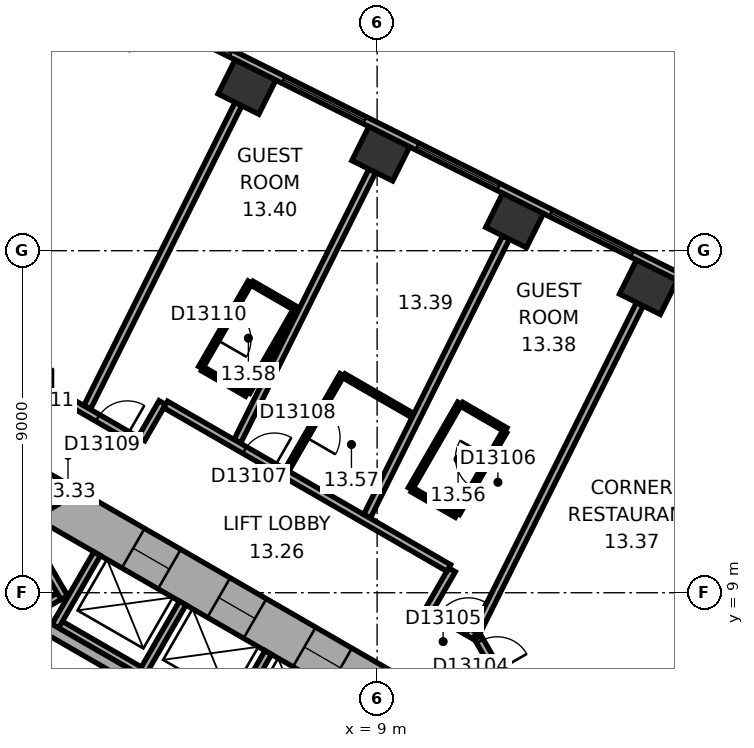
"""IFC4 building model, lengths in metres.
Left out: names, types, materials, properties, quantities, classifications, styles, units other than length and angle.
Written with IfcOpenShell. Run it as: python <this file> out.ifc"""

import sys

from ifc_helpers import new_model, si_unit, direction, frame, frame_2d, origin, origin_2d, place, context, subcontext, project, spatial, rectangle, extrude, element, fill, save


model = new_model("IFC4")
c1 = context("Model", 3, precision=1e-05, world=origin(), true_north=direction((0.0, 1.0)))
c2 = subcontext(c1, "Body", "Model", "MODEL_VIEW")
j1 = project(units=[si_unit("LENGTHUNIT", "METRE"), si_unit("PLANEANGLEUNIT", "RADIAN")], contexts=[c1])
p1 = place(None, origin())
s1 = spatial("IfcSite", under=j1, at=p1, CompositionType="ELEMENT")
p2 = place(p1, origin())
s2 = spatial("IfcBuilding", under=s1, at=p2, CompositionType="ELEMENT")
p3 = place(p2, frame((0.0, 0.0, 63.8)))
s3 = spatial("IfcBuildingStorey", under=s2, at=p3, CompositionType="ELEMENT", Elevation=63.8)
for number, where, z_axis, x_axis in (
    (1, (16.138, 17.04, 0.0), (0.0, 0.0, 1.0), (-0.895, 0.446, 0.0)),
    (2, (12.616, 18.795, 0.0), (0.0, 0.0, 1.0), (-0.895, 0.446, 0.0)),
    (3, (9.095, 20.551, 0.0), (0.0, 0.0, 1.0), (-0.895, 0.446, 0.0)),
    (4, (5.574, 22.306, 0.0), (0.0, 0.0, 1.0), (-0.895, 0.446, 0.0)),
):
    element("IfcColumn", number, at=place(p3, frame(where, z_axis=z_axis, x_axis=x_axis)), inside=s3, PredefinedType="COLUMN", context=c2, shape_type="SweptSolid", body=[
        extrude(rectangle(XDim=1.2, YDim=1.0, at=origin_2d()), origin(), (0.0, 0.0, 1.0), 3.3),
    ])
p4 = place(p3, frame((10.4, 5.658, 0.0), z_axis=(0.0, 0.0, 1.0), x_axis=(-0.866021384402, 0.500006961711, 0.0)))
e5 = element("IfcWall", 5, at=p4, inside=s3, PredefinedType="SHEAR", context=c2, shape_type="SweptSolid", body=[
    extrude(rectangle(XDim=12.355, YDim=1.2, at=frame_2d((6.178, 0.0))), origin(), (0.0, 0.0, 1.0), 3.3),
])
p5 = place(p4, frame((2.728, 0.0, 0.0)))
e6 = element("IfcOpeningElement", 6, at=p5, cuts=e5, PredefinedType="OPENING", context=c2, shape_type="SweptSolid", body=[
    extrude(rectangle(XDim=1.1, YDim=2.1, at=frame_2d((0.55, 1.05))), frame((0.0, 0.61, 0.0), z_axis=(0.0, -1.0, 0.0), x_axis=(1.0, 0.0, 0.0)), (0.0, 0.0, 1.0), 1.22),
])
p6 = place(p4, frame((5.328, 0.0, 0.0)))
e7 = element("IfcOpeningElement", 7, at=p6, cuts=e5, PredefinedType="OPENING", context=c2, shape_type="SweptSolid", body=[
    extrude(rectangle(XDim=1.1, YDim=2.1, at=frame_2d((0.55, 1.05))), frame((0.0, 0.61, 0.0), z_axis=(0.0, -1.0, 0.0), x_axis=(1.0, 0.0, 0.0)), (0.0, 0.0, 1.0), 1.22),
])
p7 = place(p4, frame((7.928, 0.0, 0.0)))
e8 = element("IfcOpeningElement", 8, at=p7, cuts=e5, PredefinedType="OPENING", context=c2, shape_type="SweptSolid", body=[
    extrude(rectangle(XDim=1.1, YDim=2.1, at=frame_2d((0.55, 1.05))), frame((0.0, 0.61, 0.0), z_axis=(0.0, -1.0, 0.0), x_axis=(1.0, 0.0, 0.0)), (0.0, 0.0, 1.0), 1.22),
])
p8 = place(p3, frame((0.3, 11.836, 0.0), z_axis=(0.0, 0.0, 1.0), x_axis=(-0.866021384402, -0.500006961711, 0.0)))
e9 = element("IfcWall", 9, at=p8, inside=s3, PredefinedType="SHEAR", context=c2, shape_type="SweptSolid", body=[
    extrude(rectangle(XDim=12.355, YDim=1.2, at=frame_2d((6.178, 0.0))), origin(), (0.0, 0.0, 1.0), 3.3),
])
p9 = place(p8, frame((6.378, 0.0, 0.0)))
e10 = element("IfcOpeningElement", 10, at=p9, cuts=e9, PredefinedType="OPENING", context=c2, shape_type="SweptSolid", body=[
    extrude(rectangle(XDim=1.5, YDim=2.1, at=frame_2d((0.75, 1.05))), frame((0.0, 0.61, 0.0), z_axis=(0.0, -1.0, 0.0), x_axis=(1.0, 0.0, 0.0)), (0.0, 0.0, 1.0), 1.22),
])
p10 = place(p8, frame((1.828, 0.0, 0.0)))
e11 = element("IfcOpeningElement", 11, at=p10, cuts=e9, PredefinedType="OPENING", context=c2, shape_type="SweptSolid", body=[
    extrude(rectangle(XDim=1.1, YDim=2.1, at=frame_2d((0.55, 1.05))), frame((0.0, 0.61, 0.0), z_axis=(0.0, -1.0, 0.0), x_axis=(1.0, 0.0, 0.0)), (0.0, 0.0, 1.0), 1.22),
])
p11 = place(p3, frame((20.63, 15.47, 0.0), z_axis=(0.0, 0.0, 1.0), x_axis=(-0.894934518609, 0.446197498203, 0.0)))
e12 = element("IfcWall", 12, at=p11, inside=s3, PredefinedType="STANDARD", context=c2, shape_type="SweptSolid", body=[
    extrude(rectangle(XDim=21.246, YDim=0.2, at=frame_2d((10.623, 0.0))), origin(), (0.0, 0.0, 1.0), 3.3),
])
p12 = place(p11, frame((1.553, 0.0, 0.8)))
e13 = element("IfcOpeningElement", 13, at=p12, cuts=e12, PredefinedType="OPENING", context=c2, shape_type="SweptSolid", body=[
    extrude(rectangle(XDim=2.4, YDim=1.7, at=frame_2d((1.2, 0.85))), frame((0.0, 0.11, 0.0), z_axis=(0.0, -1.0, 0.0), x_axis=(1.0, 0.0, 0.0)), (0.0, 0.0, 1.0), 0.22),
])
p13 = place(p11, frame((5.488, 0.0, 0.8)))
e14 = element("IfcOpeningElement", 14, at=p13, cuts=e12, PredefinedType="OPENING", context=c2, shape_type="SweptSolid", body=[
    extrude(rectangle(XDim=2.4, YDim=1.7, at=frame_2d((1.2, 0.85))), frame((0.0, 0.11, 0.0), z_axis=(0.0, -1.0, 0.0), x_axis=(1.0, 0.0, 0.0)), (0.0, 0.0, 1.0), 0.22),
])
p14 = place(p11, frame((9.422, 0.0, 0.8)))
e15 = element("IfcOpeningElement", 15, at=p14, cuts=e12, PredefinedType="OPENING", context=c2, shape_type="SweptSolid", body=[
    extrude(rectangle(XDim=2.4, YDim=1.7, at=frame_2d((1.2, 0.85))), frame((0.0, 0.11, 0.0), z_axis=(0.0, -1.0, 0.0), x_axis=(1.0, 0.0, 0.0)), (0.0, 0.0, 1.0), 0.22),
])
p15 = place(p11, frame((13.357, 0.0, 0.8)))
e16 = element("IfcOpeningElement", 16, at=p15, cuts=e12, PredefinedType="OPENING", context=c2, shape_type="SweptSolid", body=[
    extrude(rectangle(XDim=2.4, YDim=1.7, at=frame_2d((1.2, 0.85))), frame((0.0, 0.11, 0.0), z_axis=(0.0, -1.0, 0.0), x_axis=(1.0, 0.0, 0.0)), (0.0, 0.0, 1.0), 0.22),
])
p16 = place(p11, frame((17.292, 0.0, 0.8)))
e17 = element("IfcOpeningElement", 17, at=p16, cuts=e12, PredefinedType="OPENING", context=c2, shape_type="SweptSolid", body=[
    extrude(rectangle(XDim=2.4, YDim=1.7, at=frame_2d((1.2, 0.85))), frame((0.0, 0.11, 0.0), z_axis=(0.0, -1.0, 0.0), x_axis=(1.0, 0.0, 0.0)), (0.0, 0.0, 1.0), 0.22),
])
p17 = place(p3, frame((7.424, 4.259, 0.0), z_axis=(0.0, 0.0, 1.0), x_axis=(-0.866026010844, 0.49999894854, 0.0)))
e18 = element("IfcWall", 18, at=p17, inside=s3, PredefinedType="PARTITIONING", context=c2, shape_type="SweptSolid", body=[
    extrude(rectangle(XDim=8.0, YDim=0.2, at=frame_2d((4.0, 0.0))), origin(), (0.0, 0.0, 1.0), 3.05),
])
for number, where, z_axis, x_axis in (
    (19, (5.036, 5.522, 0.0), (0.0, 0.0, 1.0), (0.5, 0.866, 0.0)),
    (20, (2.784, 6.822, 0.0), (0.0, 0.0, 1.0), (0.5, 0.866, 0.0)),
    (21, (0.532, 8.122, 0.0), (0.0, 0.0, 1.0), (0.5, 0.866, 0.0)),
):
    element("IfcWall", number, at=place(p3, frame(where, z_axis=z_axis, x_axis=x_axis)), inside=s3, PredefinedType="PARTITIONING", context=c2, shape_type="SweptSolid", body=[
        extrude(rectangle(XDim=2.2, YDim=0.2, at=frame_2d((1.1, 0.0))), origin(), (0.0, 0.0, 1.0), 3.05),
    ])
p18 = place(p3, frame((0.803, 9.009, 0.0), z_axis=(0.0, 0.0, 1.0), x_axis=(-0.866028230842, -0.499995103361, 0.0)))
e22 = element("IfcWall", 22, at=p18, inside=s3, PredefinedType="PARTITIONING", context=c2, shape_type="SweptSolid", body=[
    extrude(rectangle(XDim=5.4, YDim=0.2, at=frame_2d((2.7, 0.0))), origin(), (0.0, 0.0, 1.0), 3.05),
])
p19 = place(p3, frame((0.767, 8.872, 0.0), z_axis=(0.0, 0.0, 1.0), x_axis=(-0.499994660107, 0.866028486751, 0.0)))
e23 = element("IfcWall", 23, at=p19, inside=s3, PredefinedType="PARTITIONING", context=c2, shape_type="SweptSolid", body=[
    extrude(rectangle(XDim=2.2, YDim=0.2, at=frame_2d((1.1, 0.0))), origin(), (0.0, 0.0, 1.0), 3.05),
])
p20 = place(p3, frame((6.303, 4.617, 0.0), z_axis=(0.0, 0.0, 1.0), x_axis=(-0.866027801685, 0.499995846692, 0.0)))
e24 = element("IfcWall", 24, at=p20, inside=s3, PredefinedType="SHEAR", context=c2, shape_type="SweptSolid", body=[
    extrude(rectangle(XDim=7.06, YDim=0.3, at=frame_2d((3.53, 0.0))), origin(), (0.0, 0.0, 1.0), 3.05),
])
p21 = place(p3, frame((0.95, 14.001, 0.0), z_axis=(0.0, 0.0, 1.0), x_axis=(-1.0, 0.0, 0.0)))
e25 = element("IfcWall", 25, at=p21, inside=s3, PredefinedType="PARTITIONING", context=c2, shape_type="SweptSolid", body=[
    extrude(rectangle(XDim=1.86, YDim=0.2, at=frame_2d((0.93, 0.0))), origin(), (0.0, 0.0, 1.0), 3.05),
])
p22 = place(p21, frame((0.48, 0.0, 0.0)))
e26 = element("IfcOpeningElement", 26, at=p22, cuts=e25, PredefinedType="OPENING", context=c2, shape_type="SweptSolid", body=[
    extrude(rectangle(XDim=0.9, YDim=2.1, at=frame_2d((0.45, 1.05))), frame((0.0, 0.11, 0.0), z_axis=(0.0, -1.0, 0.0), x_axis=(1.0, 0.0, 0.0)), (0.0, 0.0, 1.0), 0.22),
])
p23 = place(p3, frame((2.748, 12.962, 0.0), z_axis=(0.0, 0.0, 1.0), x_axis=(-0.866013897511, 0.50001992892, 0.0)))
e27 = element("IfcWall", 27, at=p23, inside=s3, PredefinedType="PARTITIONING", context=c2, shape_type="SweptSolid", body=[
    extrude(rectangle(XDim=2.037, YDim=0.2, at=frame_2d((1.018, 0.0))), origin(), (0.0, 0.0, 1.0), 3.05),
])
p24 = place(p23, frame((0.372, 0.0, 0.0)))
e28 = element("IfcOpeningElement", 28, at=p24, cuts=e27, PredefinedType="OPENING", context=c2, shape_type="SweptSolid", body=[
    extrude(rectangle(XDim=0.9, YDim=2.1, at=frame_2d((0.45, 1.05))), frame((0.0, 0.11, 0.0), z_axis=(0.0, -1.0, 0.0), x_axis=(1.0, 0.0, 0.0)), (0.0, 0.0, 1.0), 0.22),
])
p25 = place(p3, frame((3.349, 14.002, 0.0), z_axis=(0.0, 0.0, 1.0), x_axis=(-0.500074377092, -0.865982457891, 0.0)))
e29 = element("IfcWall", 29, at=p25, inside=s3, PredefinedType="PARTITIONING", context=c2, shape_type="SweptSolid", body=[
    extrude(rectangle(XDim=1.101, YDim=0.2, at=frame_2d((0.55, 0.0))), origin(), (0.0, 0.0, 1.0), 3.05),
])
p26 = place(p3, frame((4.356, 14.922, 0.0), z_axis=(0.0, 0.0, 1.0), x_axis=(0.499936506574, 0.866062058628, 0.0)))
e30 = element("IfcWall", 30, at=p26, inside=s3, PredefinedType="PARTITIONING", context=c2, shape_type="SweptSolid", body=[
    extrude(rectangle(XDim=2.6, YDim=0.12, at=frame_2d((1.3, 0.0))), origin(), (0.0, 0.0, 1.0), 3.05),
])
p27 = place(p26, frame((0.85, 0.0, 0.0)))
e31 = element("IfcOpeningElement", 31, at=p27, cuts=e30, PredefinedType="OPENING", context=c2, shape_type="SweptSolid", body=[
    extrude(rectangle(XDim=0.9, YDim=2.1, at=frame_2d((0.45, 1.05))), frame((0.0, 0.07, 0.0), z_axis=(0.0, -1.0, 0.0), x_axis=(1.0, 0.0, 0.0)), (0.0, 0.0, 1.0), 0.14),
])
p28 = place(p3, frame((5.351, 21.859, 0.0), z_axis=(0.0, 0.0, 1.0), x_axis=(-0.446205309328, -0.894930624086, 0.0)))
e32 = element("IfcWall", 32, at=p28, inside=s3, PredefinedType="PARTITIONING", context=c2, shape_type="SweptSolid", body=[
    extrude(rectangle(XDim=8.913, YDim=0.2, at=frame_2d((4.457, 0.0))), origin(), (0.0, 0.0, 1.0), 2.6),
])
p29 = place(p3, frame((5.569, 14.222, 0.0), z_axis=(0.0, 0.0, 1.0), x_axis=(-0.866036909293, 0.499980071345, 0.0)))
e33 = element("IfcWall", 33, at=p29, inside=s3, PredefinedType="PARTITIONING", context=c2, shape_type="SweptSolid", body=[
    extrude(rectangle(XDim=1.34, YDim=0.12, at=frame_2d((0.67, 0.0))), origin(), (0.0, 0.0, 1.0), 3.05),
])
p30 = place(p3, frame((5.708, 17.144, 0.0), z_axis=(0.0, 0.0, 1.0), x_axis=(0.866082447003, -0.499901185229, 0.0)))
e34 = element("IfcWall", 34, at=p30, inside=s3, PredefinedType="PARTITIONING", context=c2, shape_type="SweptSolid", body=[
    extrude(rectangle(XDim=1.34, YDim=0.12, at=frame_2d((0.67, 0.0))), origin(), (0.0, 0.0, 1.0), 3.05),
])
p31 = place(p3, frame((6.625, 12.227, 0.0), z_axis=(0.0, 0.0, 1.0), x_axis=(0.500023687443, 0.866011727401, 0.0)))
e35 = element("IfcWall", 35, at=p31, inside=s3, PredefinedType="PARTITIONING", context=c2, shape_type="SweptSolid", body=[
    extrude(rectangle(XDim=2.9, YDim=0.12, at=frame_2d((1.45, 0.0))), origin(), (0.0, 0.0, 1.0), 3.05),
])
p32 = place(p31, frame((1.0, 0.0, 0.0)))
e36 = element("IfcOpeningElement", 36, at=p32, cuts=e35, PredefinedType="OPENING", context=c2, shape_type="SweptSolid", body=[
    extrude(rectangle(XDim=0.9, YDim=2.1, at=frame_2d((0.45, 1.05))), frame((0.0, 0.07, 0.0), z_axis=(0.0, -1.0, 0.0), x_axis=(1.0, 0.0, 0.0)), (0.0, 0.0, 1.0), 0.14),
])
p33 = place(p3, frame((6.839, 16.422, 0.0), z_axis=(0.0, 0.0, 1.0), x_axis=(-0.50000366821, -0.866023285932, 0.0)))
e37 = element("IfcWall", 37, at=p33, inside=s3, PredefinedType="PARTITIONING", context=c2, shape_type="SweptSolid", body=[
    extrude(rectangle(XDim=2.48, YDim=0.12, at=frame_2d((1.24, 0.0))), origin(), (0.0, 0.0, 1.0), 3.05),
])
p34 = place(p3, frame((8.127, 14.708, 0.0), z_axis=(0.0, 0.0, 1.0), x_axis=(0.866065472234, -0.499930592986, 0.0)))
e38 = element("IfcWall", 38, at=p34, inside=s3, PredefinedType="PARTITIONING", context=c2, shape_type="SweptSolid", body=[
    extrude(rectangle(XDim=2.098, YDim=0.12, at=frame_2d((1.049, 0.0))), origin(), (0.0, 0.0, 1.0), 3.05),
])
p35 = place(p3, frame((8.872, 20.104, 0.0), z_axis=(0.0, 0.0, 1.0), x_axis=(-0.446218378653, -0.894924107706, 0.0)))
e39 = element("IfcWall", 39, at=p35, inside=s3, PredefinedType="PARTITIONING", context=c2, shape_type="SweptSolid", body=[
    extrude(rectangle(XDim=7.95, YDim=0.2, at=frame_2d((3.975, 0.0))), origin(), (0.0, 0.0, 1.0), 3.05),
])
p36 = place(p3, frame((9.875, 11.736, 0.0), z_axis=(0.0, 0.0, 1.0), x_axis=(0.499936506574, 0.866062058628, 0.0)))
e40 = element("IfcWall", 40, at=p36, inside=s3, PredefinedType="PARTITIONING", context=c2, shape_type="SweptSolid", body=[
    extrude(rectangle(XDim=2.6, YDim=0.12, at=frame_2d((1.3, 0.0))), origin(), (0.0, 0.0, 1.0), 3.05),
])
p37 = place(p3, frame((10.371, 8.561, 0.0), z_axis=(0.0, 0.0, 1.0), x_axis=(0.499986357472, 0.866033280158, 0.0)))
e41 = element("IfcWall", 41, at=p37, inside=s3, PredefinedType="PARTITIONING", context=c2, shape_type="SweptSolid", body=[
    extrude(rectangle(XDim=1.201, YDim=0.2, at=frame_2d((0.601, 0.0))), origin(), (0.0, 0.0, 1.0), 3.05),
])
p38 = place(p3, frame((10.885, 9.652, 0.0), z_axis=(0.0, 0.0, 1.0), x_axis=(-0.866033868542, 0.499985338323, 0.0)))
e42 = element("IfcWall", 42, at=p38, inside=s3, PredefinedType="PARTITIONING", context=c2, shape_type="SweptSolid", body=[
    extrude(rectangle(XDim=8.602, YDim=0.2, at=frame_2d((4.301, 0.0))), origin(), (0.0, 0.0, 1.0), 3.05),
])
p39 = place(p38, frame((5.302, 0.0, 0.0)))
e43 = element("IfcOpeningElement", 43, at=p39, cuts=e42, PredefinedType="OPENING", context=c2, shape_type="SweptSolid", body=[
    extrude(rectangle(XDim=0.9, YDim=2.1, at=frame_2d((0.45, 1.05))), frame((0.0, 0.11, 0.0), z_axis=(0.0, -1.0, 0.0), x_axis=(1.0, 0.0, 0.0)), (0.0, 0.0, 1.0), 0.22),
])
for number, where, z_axis, x_axis in (
    (44, (11.087, 11.036, 0.0), (0.0, 0.0, 1.0), (-0.866, 0.5, 0.0)),
    (45, (11.226, 13.958, 0.0), (0.0, 0.0, 1.0), (0.866, -0.5, 0.0)),
):
    element("IfcWall", number, at=place(p3, frame(where, z_axis=z_axis, x_axis=x_axis)), inside=s3, PredefinedType="PARTITIONING", context=c2, shape_type="SweptSolid", body=[
        extrude(rectangle(XDim=1.34, YDim=0.12, at=frame_2d((0.67, 0.0))), origin(), (0.0, 0.0, 1.0), 3.05),
    ])
p40 = place(p3, frame((11.566, 7.871, 0.0), z_axis=(0.0, 0.0, 1.0), x_axis=(-0.866004557827, 0.500036104519, 0.0)))
e46 = element("IfcWall", 46, at=p40, inside=s3, PredefinedType="PARTITIONING", context=c2, shape_type="SweptSolid", body=[
    extrude(rectangle(XDim=1.28, YDim=0.2, at=frame_2d((0.64, 0.0))), origin(), (0.0, 0.0, 1.0), 3.05),
])
p41 = place(p40, frame((0.19, 0.0, 0.0)))
e47 = element("IfcOpeningElement", 47, at=p41, cuts=e46, PredefinedType="OPENING", context=c2, shape_type="SweptSolid", body=[
    extrude(rectangle(XDim=0.9, YDim=2.1, at=frame_2d((0.45, 1.05))), frame((0.0, 0.11, 0.0), z_axis=(0.0, -1.0, 0.0), x_axis=(1.0, 0.0, 0.0)), (0.0, 0.0, 1.0), 0.22),
])
p42 = place(p3, frame((12.357, 13.236, 0.0), z_axis=(0.0, 0.0, 1.0), x_axis=(-0.50000366821, -0.866023285932, 0.0)))
e48 = element("IfcWall", 48, at=p42, inside=s3, PredefinedType="PARTITIONING", context=c2, shape_type="SweptSolid", body=[
    extrude(rectangle(XDim=2.48, YDim=0.12, at=frame_2d((1.24, 0.0))), origin(), (0.0, 0.0, 1.0), 3.05),
])
p43 = place(p42, frame((0.79, 0.0, 0.0)))
e49 = element("IfcOpeningElement", 49, at=p43, cuts=e48, PredefinedType="OPENING", context=c2, shape_type="SweptSolid", body=[
    extrude(rectangle(XDim=0.9, YDim=2.1, at=frame_2d((0.45, 1.05))), frame((0.0, 0.07, 0.0), z_axis=(0.0, -1.0, 0.0), x_axis=(1.0, 0.0, 0.0)), (0.0, 0.0, 1.0), 0.14),
])
p44 = place(p3, frame((12.393, 18.348, 0.0), z_axis=(0.0, 0.0, 1.0), x_axis=(-0.446176022699, -0.894945225569, 0.0)))
e50 = element("IfcWall", 50, at=p44, inside=s3, PredefinedType="PARTITIONING", context=c2, shape_type="SweptSolid", body=[
    extrude(rectangle(XDim=8.191, YDim=0.2, at=frame_2d((4.095, 0.0))), origin(), (0.0, 0.0, 1.0), 2.6),
])
p45 = place(p3, frame((12.58, 6.212, 0.0), z_axis=(0.0, 0.0, 1.0), x_axis=(-0.500063286585, 0.865988862174, 0.0)))
e51 = element("IfcWall", 51, at=p45, inside=s3, PredefinedType="PARTITIONING", context=c2, shape_type="SweptSolid", body=[
    extrude(rectangle(XDim=1.86, YDim=0.2, at=frame_2d((0.93, 0.0))), origin(), (0.0, 0.0, 1.0), 3.05),
])
p46 = place(p45, frame((0.842, 0.0, 0.0)))
e52 = element("IfcOpeningElement", 52, at=p46, cuts=e51, PredefinedType="OPENING", context=c2, shape_type="SweptSolid", body=[
    extrude(rectangle(XDim=0.9, YDim=2.1, at=frame_2d((0.45, 1.05))), frame((0.0, 0.11, 0.0), z_axis=(0.0, -1.0, 0.0), x_axis=(1.0, 0.0, 0.0)), (0.0, 0.0, 1.0), 0.22),
])
p47 = place(p3, frame((15.915, 16.592, 0.0), z_axis=(0.0, 0.0, 1.0), x_axis=(-0.446199736347, -0.894933402709, 0.0)))
e53 = element("IfcWall", 53, at=p47, inside=s3, PredefinedType="PARTITIONING", context=c2, shape_type="SweptSolid", body=[
    extrude(rectangle(XDim=9.635, YDim=0.2, at=frame_2d((4.817, 0.0))), origin(), (0.0, 0.0, 1.0), 3.05),
])
p48 = place(p13, origin())
e54 = element("IfcWindow", 54, at=p48, inside=s3, PartitioningType="SINGLE_PANEL", PredefinedType="WINDOW", context=c2, shape_type="SweptSolid", body=[
    extrude(rectangle(XDim=2.4, YDim=1.7, at=frame_2d((1.2, 0.85))), frame((0.0, 0.03, 0.0), z_axis=(0.0, -1.0, 0.0), x_axis=(1.0, 0.0, 0.0)), (0.0, 0.0, 1.0), 0.06),
])
fill(e14, e54)
p49 = place(p14, origin())
e55 = element("IfcWindow", 55, at=p49, inside=s3, PartitioningType="SINGLE_PANEL", PredefinedType="WINDOW", context=c2, shape_type="SweptSolid", body=[
    extrude(rectangle(XDim=2.4, YDim=1.7, at=frame_2d((1.2, 0.85))), frame((0.0, 0.03, 0.0), z_axis=(0.0, -1.0, 0.0), x_axis=(1.0, 0.0, 0.0)), (0.0, 0.0, 1.0), 0.06),
])
fill(e15, e55)
p50 = place(p15, origin())
e56 = element("IfcWindow", 56, at=p50, inside=s3, PartitioningType="SINGLE_PANEL", PredefinedType="WINDOW", context=c2, shape_type="SweptSolid", body=[
    extrude(rectangle(XDim=2.4, YDim=1.7, at=frame_2d((1.2, 0.85))), frame((0.0, 0.03, 0.0), z_axis=(0.0, -1.0, 0.0), x_axis=(1.0, 0.0, 0.0)), (0.0, 0.0, 1.0), 0.06),
])
fill(e16, e56)
p51 = place(p16, origin())
e57 = element("IfcWindow", 57, at=p51, inside=s3, PartitioningType="SINGLE_PANEL", PredefinedType="WINDOW", context=c2, shape_type="SweptSolid", body=[
    extrude(rectangle(XDim=2.4, YDim=1.7, at=frame_2d((1.2, 0.85))), frame((0.0, 0.03, 0.0), z_axis=(0.0, -1.0, 0.0), x_axis=(1.0, 0.0, 0.0)), (0.0, 0.0, 1.0), 0.06),
])
fill(e17, e57)
p52 = place(p5, origin())
e58 = element("IfcDoor", 58, at=p52, inside=s3, OperationType="DOUBLE_DOOR_SLIDING", PredefinedType="DOOR", context=c2, shape_type="SweptSolid", body=[
    extrude(rectangle(XDim=1.1, YDim=2.1, at=frame_2d((0.55, 1.05))), frame((0.0, 0.025, 0.0), z_axis=(0.0, -1.0, 0.0), x_axis=(1.0, 0.0, 0.0)), (0.0, 0.0, 1.0), 0.05),
])
fill(e6, e58)
p53 = place(p6, origin())
e59 = element("IfcDoor", 59, at=p53, inside=s3, OperationType="DOUBLE_DOOR_SLIDING", PredefinedType="DOOR", context=c2, shape_type="SweptSolid", body=[
    extrude(rectangle(XDim=1.1, YDim=2.1, at=frame_2d((0.55, 1.05))), frame((0.0, 0.025, 0.0), z_axis=(0.0, -1.0, 0.0), x_axis=(1.0, 0.0, 0.0)), (0.0, 0.0, 1.0), 0.05),
])
fill(e7, e59)
p54 = place(p7, origin())
e60 = element("IfcDoor", 60, at=p54, inside=s3, OperationType="DOUBLE_DOOR_SLIDING", PredefinedType="DOOR", context=c2, shape_type="SweptSolid", body=[
    extrude(rectangle(XDim=1.1, YDim=2.1, at=frame_2d((0.55, 1.05))), frame((0.0, 0.025, 0.0), z_axis=(0.0, -1.0, 0.0), x_axis=(1.0, 0.0, 0.0)), (0.0, 0.0, 1.0), 0.05),
])
fill(e8, e60)
p55 = place(p46, origin())
e61 = element("IfcDoor", 61, at=p55, inside=s3, OperationType="SINGLE_SWING_LEFT", PredefinedType="DOOR", context=c2, shape_type="SweptSolid", body=[
    extrude(rectangle(XDim=0.9, YDim=2.1, at=frame_2d((0.45, 1.05))), frame((0.0, 0.025, 0.0), z_axis=(0.0, -1.0, 0.0), x_axis=(1.0, 0.0, 0.0)), (0.0, 0.0, 1.0), 0.05),
])
fill(e52, e61)
p56 = place(p41, origin())
e62 = element("IfcDoor", 62, at=p56, inside=s3, OperationType="SINGLE_SWING_LEFT", PredefinedType="DOOR", context=c2, shape_type="SweptSolid", body=[
    extrude(rectangle(XDim=0.9, YDim=2.1, at=frame_2d((0.45, 1.05))), frame((0.0, 0.025, 0.0), z_axis=(0.0, -1.0, 0.0), x_axis=(1.0, 0.0, 0.0)), (0.0, 0.0, 1.0), 0.05),
])
fill(e47, e62)
p57 = place(p43, origin())
e63 = element("IfcDoor", 63, at=p57, inside=s3, OperationType="SINGLE_SWING_LEFT", PredefinedType="DOOR", context=c2, shape_type="SweptSolid", body=[
    extrude(rectangle(XDim=0.9, YDim=2.1, at=frame_2d((0.45, 1.05))), frame((0.0, 0.025, 0.0), z_axis=(0.0, -1.0, 0.0), x_axis=(1.0, 0.0, 0.0)), (0.0, 0.0, 1.0), 0.05),
])
fill(e49, e63)
p58 = place(p39, origin())
e64 = element("IfcDoor", 64, at=p58, inside=s3, OperationType="SINGLE_SWING_LEFT", PredefinedType="DOOR", context=c2, shape_type="SweptSolid", body=[
    extrude(rectangle(XDim=0.9, YDim=2.1, at=frame_2d((0.45, 1.05))), frame((0.0, 0.025, 0.0), z_axis=(0.0, -1.0, 0.0), x_axis=(1.0, 0.0, 0.0)), (0.0, 0.0, 1.0), 0.05),
])
fill(e43, e64)
p59 = place(p32, origin())
e65 = element("IfcDoor", 65, at=p59, inside=s3, OperationType="SINGLE_SWING_LEFT", PredefinedType="DOOR", context=c2, shape_type="SweptSolid", body=[
    extrude(rectangle(XDim=0.9, YDim=2.1, at=frame_2d((0.45, 1.05))), frame((0.0, 0.025, 0.0), z_axis=(0.0, -1.0, 0.0), x_axis=(1.0, 0.0, 0.0)), (0.0, 0.0, 1.0), 0.05),
])
fill(e36, e65)
p60 = place(p24, origin())
e66 = element("IfcDoor", 66, at=p60, inside=s3, OperationType="SINGLE_SWING_LEFT", PredefinedType="DOOR", context=c2, shape_type="SweptSolid", body=[
    extrude(rectangle(XDim=0.9, YDim=2.1, at=frame_2d((0.45, 1.05))), frame((0.0, 0.025, 0.0), z_axis=(0.0, -1.0, 0.0), x_axis=(1.0, 0.0, 0.0)), (0.0, 0.0, 1.0), 0.05),
])
fill(e28, e66)
p61 = place(p27, origin())
e67 = element("IfcDoor", 67, at=p61, inside=s3, OperationType="SINGLE_SWING_LEFT", PredefinedType="DOOR", context=c2, shape_type="SweptSolid", body=[
    extrude(rectangle(XDim=0.9, YDim=2.1, at=frame_2d((0.45, 1.05))), frame((0.0, 0.025, 0.0), z_axis=(0.0, -1.0, 0.0), x_axis=(1.0, 0.0, 0.0)), (0.0, 0.0, 1.0), 0.05),
])
fill(e31, e67)
p62 = place(p22, origin())
e68 = element("IfcDoor", 68, at=p62, inside=s3, OperationType="SINGLE_SWING_LEFT", PredefinedType="DOOR", context=c2, shape_type="SweptSolid", body=[
    extrude(rectangle(XDim=0.9, YDim=2.1, at=frame_2d((0.45, 1.05))), frame((0.0, 0.025, 0.0), z_axis=(0.0, -1.0, 0.0), x_axis=(1.0, 0.0, 0.0)), (0.0, 0.0, 1.0), 0.05),
])
fill(e26, e68)
save(model, sys.argv[1])
